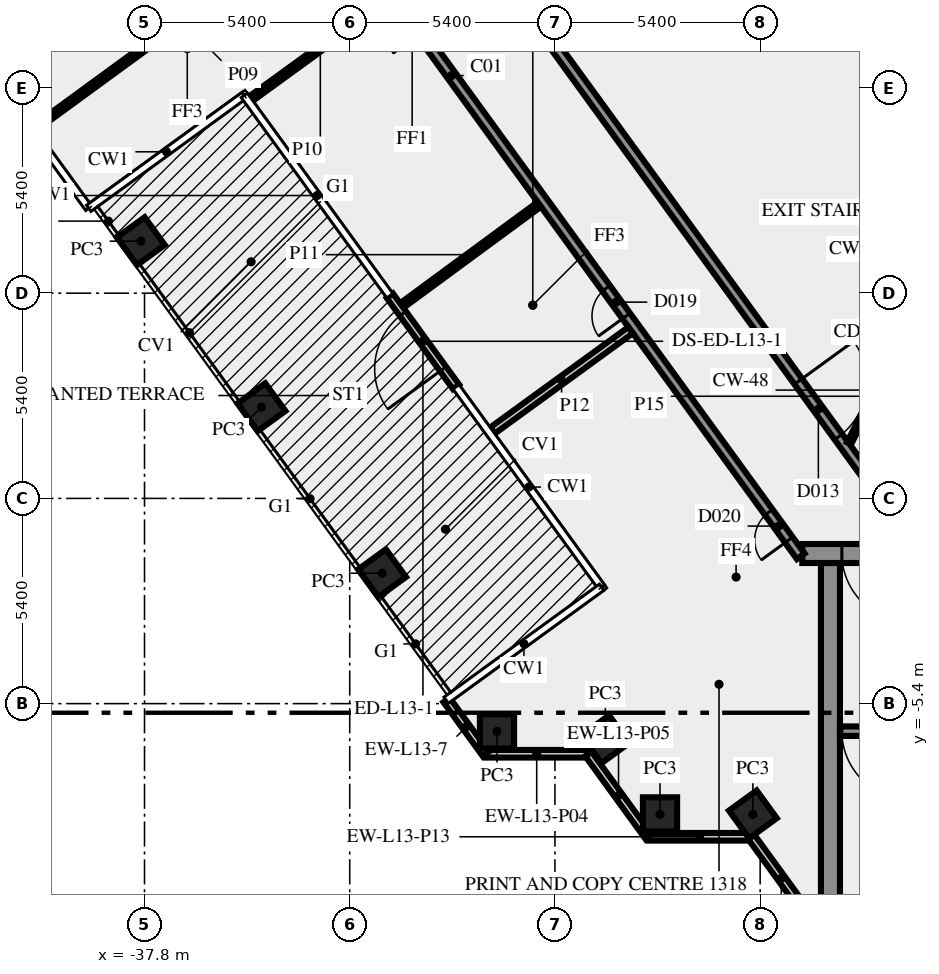
"""IFC4 building model, lengths in metres.
Left out: names, types, materials, properties, quantities, classifications, styles, units other than length and angle.
Written with IfcOpenShell. Run it as: python <this file> out.ifc"""

import sys

from ifc_helpers import new_model, si_unit, direction, frame, frame_2d, origin, origin_2d, place, context, subcontext, project, spatial, rectangle, extrude, element, fill, save


model = new_model("IFC4")
c1 = context("Model", 3, precision=1e-05, world=origin(), true_north=direction((0.0, 1.0)))
c2 = subcontext(c1, "Body", "Model", "MODEL_VIEW")
j1 = project(units=[si_unit("LENGTHUNIT", "METRE"), si_unit("PLANEANGLEUNIT", "RADIAN")], contexts=[c1])
p1 = place(None, origin())
s1 = spatial("IfcSite", under=j1, at=p1, CompositionType="ELEMENT")
p2 = place(p1, origin())
s2 = spatial("IfcBuilding", under=s1, at=p2, CompositionType="ELEMENT")
p3 = place(p2, frame((0.0, 0.0, 59.0)))
s3 = spatial("IfcBuildingStorey", under=s2, at=p3, CompositionType="ELEMENT", Elevation=59.0)
for number, where, z_axis, x_axis in (
    (1, (-37.896, 6.769, 0.0), (0.0, 0.0, 1.0), (0.588, -0.809, 0.0)),
    (2, (-34.722, 2.4, 0.0), (0.0, 0.0, 1.0), (0.588, -0.809, 0.0)),
    (3, (-31.548, -1.969, 0.0), (0.0, 0.0, 1.0), (0.588, -0.809, 0.0)),
    (4, (-28.525, -6.13, 0.0), (0.0, 0.0, 1.0), (1.0, 0.0, 0.0)),
    (5, (-25.674, -6.337, 0.0), (0.0, 0.0, 1.0), (0.588, -0.809, 0.0)),
    (6, (-24.235, -8.315, 0.0), (0.0, 0.0, 1.0), (1.0, 0.0, 0.0)),
    (7, (-21.792, -8.315, 0.0), (0.0, 0.0, 1.0), (0.588, -0.809, 0.0)),
):
    element("IfcColumn", number, at=place(p3, frame(where, z_axis=z_axis, x_axis=x_axis)), inside=s3, PredefinedType="COLUMN", context=c2, shape_type="SweptSolid", body=[
        extrude(rectangle(XDim=0.9, YDim=0.9, at=origin_2d()), origin(), (0.0, 0.0, 1.0), 3.65),
    ])
p4 = place(p3, frame((-28.83, -6.719, 0.0), z_axis=(0.0, 0.0, 1.0), x_axis=(1.0, 0.0, 0.0)))
e8 = element("IfcWall", 8, at=p4, inside=s3, PredefinedType="SOLIDWALL", context=c2, shape_type="SweptSolid", body=[
    extrude(rectangle(XDim=2.7, YDim=0.2, at=frame_2d((1.35, 0.0))), origin(), (0.0, 0.0, 1.0), 3.65),
])
p5 = place(p3, frame((-26.12, -6.724, 0.0), z_axis=(0.0, 0.0, 1.0), x_axis=(0.587720002413, -0.809064397168, 0.0)))
e9 = element("IfcWall", 9, at=p5, inside=s3, PredefinedType="SOLIDWALL", context=c2, shape_type="SweptSolid", body=[
    extrude(rectangle(XDim=2.7, YDim=0.2, at=frame_2d((1.35, 0.0))), origin(), (0.0, 0.0, 1.0), 3.65),
])
p6 = place(p3, frame((-29.602, 2.936, 0.0), z_axis=(0.0, 0.0, 1.0), x_axis=(-0.587735577821, 0.809053082661, 0.0)))
e10 = element("IfcWall", 10, at=p6, inside=s3, PredefinedType="SOLIDWALL", context=c2, shape_type="SweptSolid", body=[
    extrude(rectangle(XDim=2.963, YDim=0.2, at=frame_2d((1.481, 0.0))), origin(), (0.0, 0.0, 1.0), 3.65),
])
p7 = place(p6, frame((0.582, 0.0, 0.0)))
e11 = element("IfcOpeningElement", 11, at=p7, cuts=e10, PredefinedType="OPENING", context=c2, shape_type="SweptSolid", body=[
    extrude(rectangle(XDim=1.8, YDim=2.4, at=frame_2d((0.9, 1.2))), frame((0.0, 0.11, 0.0), z_axis=(0.0, -1.0, 0.0), x_axis=(1.0, 0.0, 0.0)), (0.0, 0.0, 1.0), 0.22),
])
p8 = place(p3, frame((-29.852, -5.304, 0.0), z_axis=(0.0, 0.0, 1.0), x_axis=(0.587783029048, -0.809018609652, 0.0)))
e12 = element("IfcWall", 12, at=p8, inside=s3, PredefinedType="SOLIDWALL", context=c2, shape_type="SweptSolid", body=[
    extrude(rectangle(XDim=1.756, YDim=0.2, at=frame_2d((0.878, 0.0))), origin(), (0.0, 0.0, 1.0), 3.65),
])
p9 = place(p3, frame((-24.543, -8.904, 0.0), z_axis=(0.0, 0.0, 1.0), x_axis=(1.0, 0.0, 0.0)))
e13 = element("IfcWall", 13, at=p9, inside=s3, PredefinedType="SOLIDWALL", context=c2, shape_type="SweptSolid", body=[
    extrude(rectangle(XDim=2.7, YDim=0.2, at=frame_2d((1.35, 0.0))), origin(), (0.0, 0.0, 1.0), 3.65),
])
p10 = place(p3, frame((-21.833, -8.909, 0.0), z_axis=(0.0, 0.0, 1.0), x_axis=(0.587766567315, -0.809030569476, 0.0)))
e14 = element("IfcWall", 14, at=p10, inside=s3, PredefinedType="SOLIDWALL", context=c2, shape_type="SweptSolid", body=[
    extrude(rectangle(XDim=2.688, YDim=0.2, at=frame_2d((1.344, 0.0))), origin(), (0.0, 0.0, 1.0), 3.65),
])
p11 = place(p3, frame((-19.75, -10.5, 0.0), z_axis=(0.0, 0.0, 1.0), x_axis=(0.0, 1.0, 0.0)))
e15 = element("IfcWall", 15, at=p11, inside=s3, PredefinedType="SHEAR", context=c2, shape_type="SweptSolid", body=[
    extrude(rectangle(XDim=8.8, YDim=0.5, at=frame_2d((4.4, 0.0))), origin(), (0.0, 0.0, 1.0), 3.65),
])
p12 = place(p3, frame((-11.45, -6.125, 0.0), z_axis=(0.0, 0.0, 1.0), x_axis=(-1.0, 0.0, 0.0)))
e16 = element("IfcWall", 16, at=p12, inside=s3, PredefinedType="SHEAR", context=c2, shape_type="SweptSolid", body=[
    extrude(rectangle(XDim=8.05, YDim=0.25, at=frame_2d((4.025, 0.0))), origin(), (0.0, 0.0, 1.0), 3.65),
])
p13 = place(p12, frame((6.2, 0.0, 0.0)))
e17 = element("IfcOpeningElement", 17, at=p13, cuts=e16, PredefinedType="OPENING", context=c2, shape_type="SweptSolid", body=[
    extrude(rectangle(XDim=1.8, YDim=2.1, at=frame_2d((0.9, 1.05))), frame((0.0, 0.135, 0.0), z_axis=(0.0, -1.0, 0.0), x_axis=(1.0, 0.0, 0.0)), (0.0, 0.0, 1.0), 0.27),
])
p14 = place(p3, frame((20.49, -1.45, 0.0), z_axis=(0.0, 0.0, 1.0), x_axis=(-1.0, 0.0, 0.0)))
e18 = element("IfcWall", 18, at=p14, inside=s3, PredefinedType="SHEAR", context=c2, shape_type="SweptSolid", body=[
    extrude(rectangle(XDim=40.98, YDim=0.5, at=frame_2d((20.49, 0.0))), origin(), (0.0, 0.0, 1.0), 3.65),
])
p15 = place(p14, frame((38.14, 0.0, 0.0)))
e19 = element("IfcOpeningElement", 19, at=p15, cuts=e18, PredefinedType="OPENING", context=c2, shape_type="SweptSolid", body=[
    extrude(rectangle(XDim=1.8, YDim=2.1, at=frame_2d((0.9, 1.05))), frame((0.0, 0.26, 0.0), z_axis=(0.0, -1.0, 0.0), x_axis=(1.0, 0.0, 0.0)), (0.0, 0.0, 1.0), 0.52),
])
p16 = place(p14, frame((35.89, 0.0, 0.0)))
e20 = element("IfcOpeningElement", 20, at=p16, cuts=e18, PredefinedType="OPENING", context=c2, shape_type="SweptSolid", body=[
    extrude(rectangle(XDim=0.9, YDim=2.1, at=frame_2d((0.45, 1.05))), frame((0.0, 0.26, 0.0), z_axis=(0.0, -1.0, 0.0), x_axis=(1.0, 0.0, 0.0)), (0.0, 0.0, 1.0), 0.52),
])
p17 = place(p14, frame((32.94, 0.0, 0.0)))
e21 = element("IfcOpeningElement", 21, at=p17, cuts=e18, PredefinedType="OPENING", context=c2, shape_type="SweptSolid", body=[
    extrude(rectangle(XDim=0.9, YDim=2.1, at=frame_2d((0.45, 1.05))), frame((0.0, 0.26, 0.0), z_axis=(0.0, -1.0, 0.0), x_axis=(1.0, 0.0, 0.0)), (0.0, 0.0, 1.0), 0.52),
])
p18 = place(p14, frame((19.59, 0.0, 0.0)))
e22 = element("IfcOpeningElement", 22, at=p18, cuts=e18, PredefinedType="OPENING", context=c2, shape_type="SweptSolid", body=[
    extrude(rectangle(XDim=2.0, YDim=2.1, at=frame_2d((1.0, 1.05))), frame((0.0, 0.26, 0.0), z_axis=(0.0, -1.0, 0.0), x_axis=(1.0, 0.0, 0.0)), (0.0, 0.0, 1.0), 0.52),
])
p19 = place(p14, frame((7.14, 0.0, 0.0)))
e23 = element("IfcOpeningElement", 23, at=p19, cuts=e18, PredefinedType="OPENING", context=c2, shape_type="SweptSolid", body=[
    extrude(rectangle(XDim=0.9, YDim=2.1, at=frame_2d((0.45, 1.05))), frame((0.0, 0.26, 0.0), z_axis=(0.0, -1.0, 0.0), x_axis=(1.0, 0.0, 0.0)), (0.0, 0.0, 1.0), 0.52),
])
p20 = place(p14, frame((5.028, 0.0, 0.0)))
e24 = element("IfcOpeningElement", 24, at=p20, cuts=e18, PredefinedType="OPENING", context=c2, shape_type="SweptSolid", body=[
    extrude(rectangle(XDim=0.8, YDim=2.1, at=frame_2d((0.4, 1.05))), frame((0.0, 0.26, 0.0), z_axis=(0.0, -1.0, 0.0), x_axis=(1.0, 0.0, 0.0)), (0.0, 0.0, 1.0), 0.52),
])
p21 = place(p14, frame((3.452, 0.0, 0.0)))
e25 = element("IfcOpeningElement", 25, at=p21, cuts=e18, PredefinedType="OPENING", context=c2, shape_type="SweptSolid", body=[
    extrude(rectangle(XDim=0.8, YDim=2.1, at=frame_2d((0.4, 1.05))), frame((0.0, 0.26, 0.0), z_axis=(0.0, -1.0, 0.0), x_axis=(1.0, 0.0, 0.0)), (0.0, 0.0, 1.0), 0.52),
])
p22 = place(p14, frame((1.04, 0.0, 0.0)))
e26 = element("IfcOpeningElement", 26, at=p22, cuts=e18, PredefinedType="OPENING", context=c2, shape_type="SweptSolid", body=[
    extrude(rectangle(XDim=1.8, YDim=2.1, at=frame_2d((0.9, 1.05))), frame((0.0, 0.26, 0.0), z_axis=(0.0, -1.0, 0.0), x_axis=(1.0, 0.0, 0.0)), (0.0, 0.0, 1.0), 0.52),
])
p23 = place(p3, frame((-20.531, -1.523, 0.0), z_axis=(0.0, 0.0, 1.0), x_axis=(-0.587784593204, 0.809017473231, 0.0)))
e27 = element("IfcWall", 27, at=p23, inside=s3, PredefinedType="SOLIDWALL", context=c2, shape_type="SweptSolid", body=[
    extrude(rectangle(XDim=44.67, YDim=0.25, at=frame_2d((22.335, 0.0))), origin(), (0.0, 0.0, 1.0), 3.65),
])
p24 = place(p23, frame((43.046, 0.0, 0.0)))
e28 = element("IfcOpeningElement", 28, at=p24, cuts=e27, PredefinedType="OPENING", context=c2, shape_type="SweptSolid", body=[
    extrude(rectangle(XDim=1.2, YDim=2.1, at=frame_2d((0.6, 1.05))), frame((0.0, 0.135, 0.0), z_axis=(0.0, -1.0, 0.0), x_axis=(1.0, 0.0, 0.0)), (0.0, 0.0, 1.0), 0.27),
])
p25 = place(p23, frame((21.266, 0.0, 0.0)))
e29 = element("IfcOpeningElement", 29, at=p25, cuts=e27, PredefinedType="OPENING", context=c2, shape_type="SweptSolid", body=[
    extrude(rectangle(XDim=1.2, YDim=2.1, at=frame_2d((0.6, 1.05))), frame((0.0, 0.135, 0.0), z_axis=(0.0, -1.0, 0.0), x_axis=(1.0, 0.0, 0.0)), (0.0, 0.0, 1.0), 0.27),
])
p26 = place(p23, frame((17.015, 0.0, 0.0)))
e30 = element("IfcOpeningElement", 30, at=p26, cuts=e27, PredefinedType="OPENING", context=c2, shape_type="SweptSolid", body=[
    extrude(rectangle(XDim=0.9, YDim=2.1, at=frame_2d((0.45, 1.05))), frame((0.0, 0.135, 0.0), z_axis=(0.0, -1.0, 0.0), x_axis=(1.0, 0.0, 0.0)), (0.0, 0.0, 1.0), 0.27),
])
p27 = place(p23, frame((0.533, 0.0, 0.0)))
e31 = element("IfcOpeningElement", 31, at=p27, cuts=e27, PredefinedType="OPENING", context=c2, shape_type="SweptSolid", body=[
    extrude(rectangle(XDim=0.9, YDim=2.1, at=frame_2d((0.45, 1.05))), frame((0.0, 0.135, 0.0), z_axis=(0.0, -1.0, 0.0), x_axis=(1.0, 0.0, 0.0)), (0.0, 0.0, 1.0), 0.27),
])
p28 = place(p23, frame((18.616, 0.0, 0.0)))
e32 = element("IfcOpeningElement", 32, at=p28, cuts=e27, PredefinedType="OPENING", context=c2, shape_type="SweptSolid", body=[
    extrude(rectangle(XDim=0.9, YDim=2.1, at=frame_2d((0.45, 1.05))), frame((0.0, 0.135, 0.0), z_axis=(0.0, -1.0, 0.0), x_axis=(1.0, 0.0, 0.0)), (0.0, 0.0, 1.0), 0.27),
])
p29 = place(p23, frame((7.816, 0.0, 0.0)))
e33 = element("IfcOpeningElement", 33, at=p29, cuts=e27, PredefinedType="OPENING", context=c2, shape_type="SweptSolid", body=[
    extrude(rectangle(XDim=0.9, YDim=2.1, at=frame_2d((0.45, 1.05))), frame((0.0, 0.135, 0.0), z_axis=(0.0, -1.0, 0.0), x_axis=(1.0, 0.0, 0.0)), (0.0, 0.0, 1.0), 0.27),
])
p30 = place(p3, frame((-37.232, 25.972, 0.0), z_axis=(0.0, 0.0, 1.0), x_axis=(0.587786323093, -0.809016216391, 0.0)))
e34 = element("IfcWall", 34, at=p30, inside=s3, PredefinedType="SOLIDWALL", context=c2, shape_type="SweptSolid", body=[
    extrude(rectangle(XDim=33.493, YDim=0.25, at=frame_2d((16.747, 0.0))), origin(), (0.0, 0.0, 1.0), 3.65),
])
p31 = place(p30, frame((28.301, 0.0, 0.0)))
e35 = element("IfcOpeningElement", 35, at=p31, cuts=e34, PredefinedType="OPENING", context=c2, shape_type="SweptSolid", body=[
    extrude(rectangle(XDim=1.8, YDim=2.1, at=frame_2d((0.9, 1.05))), frame((0.0, 0.135, 0.0), z_axis=(0.0, -1.0, 0.0), x_axis=(1.0, 0.0, 0.0)), (0.0, 0.0, 1.0), 0.27),
])
p32 = place(p30, frame((4.235, 0.0, 0.0)))
e36 = element("IfcOpeningElement", 36, at=p32, cuts=e34, PredefinedType="OPENING", context=c2, shape_type="SweptSolid", body=[
    extrude(rectangle(XDim=1.8, YDim=2.1, at=frame_2d((0.9, 1.05))), frame((0.0, 0.135, 0.0), z_axis=(0.0, -1.0, 0.0), x_axis=(1.0, 0.0, 0.0)), (0.0, 0.0, 1.0), 0.27),
])
p33 = place(p30, frame((2.685, 0.0, 0.0)))
e37 = element("IfcOpeningElement", 37, at=p33, cuts=e34, PredefinedType="OPENING", context=c2, shape_type="SweptSolid", body=[
    extrude(rectangle(XDim=0.9, YDim=2.1, at=frame_2d((0.45, 1.05))), frame((0.0, 0.135, 0.0), z_axis=(0.0, -1.0, 0.0), x_axis=(1.0, 0.0, 0.0)), (0.0, 0.0, 1.0), 0.27),
])
p34 = place(p3, frame((-40.68, 9.75, 0.0), z_axis=(0.0, 0.0, 1.0), x_axis=(0.807645841498, 0.589667868135, 0.0)))
e38 = element("IfcWall", 38, at=p34, inside=s3, PredefinedType="PARTITIONING", context=c2, shape_type="SweptSolid", body=[
    extrude(rectangle(XDim=9.551, YDim=0.15, at=frame_2d((4.775, 0.0))), origin(), (0.0, 0.0, 1.0), 2.75),
])
p35 = place(p3, frame((-31.356, 13.164, 0.0), z_axis=(0.0, 0.0, 1.0), x_axis=(-0.80905553785, -0.587732198092, 0.0)))
e39 = element("IfcWall", 39, at=p35, inside=s3, PredefinedType="PARTITIONING", context=c2, shape_type="SweptSolid", body=[
    extrude(rectangle(XDim=4.493, YDim=0.15, at=frame_2d((2.247, 0.0))), origin(), (0.0, 0.0, 1.0), 3.65),
])
p36 = place(p3, frame((-31.008, 5.091, 0.0), z_axis=(0.0, 0.0, 1.0), x_axis=(0.805604164151, 0.592454159157, 0.0)))
e40 = element("IfcWall", 40, at=p36, inside=s3, PredefinedType="PARTITIONING", context=c2, shape_type="SweptSolid", body=[
    extrude(rectangle(XDim=4.462, YDim=0.15, at=frame_2d((2.231, 0.0))), origin(), (0.0, 0.0, 1.0), 3.65),
])
p37 = place(p3, frame((-25.008, 4.427, 0.0), z_axis=(0.0, 0.0, 1.0), x_axis=(-0.809074306937, -0.58770636023, 0.0)))
e41 = element("IfcWall", 41, at=p37, inside=s3, PredefinedType="SOLIDWALL", context=c2, shape_type="SweptSolid", body=[
    extrude(rectangle(XDim=4.493, YDim=0.2, at=frame_2d((2.247, 0.0))), origin(), (0.0, 0.0, 1.0), 3.65),
])
p38 = place(p3, frame((-19.261, 1.45, 0.0), z_axis=(0.0, 0.0, 1.0), x_axis=(0.453950796792, 0.891026752736, 0.0)))
e42 = element("IfcWall", 42, at=p38, inside=s3, PredefinedType="PARTITIONING", context=c2, shape_type="SweptSolid", body=[
    extrude(rectangle(XDim=2.778, YDim=0.12, at=frame_2d((1.389, 0.0))), origin(), (0.0, 0.0, 1.0), 3.65),
])
p39 = place(p7, origin())
e43 = element("IfcDoor", 43, at=p39, inside=s3, OperationType="DOUBLE_DOOR_SINGLE_SWING", PredefinedType="DOOR", context=c2, shape_type="SweptSolid", body=[
    extrude(rectangle(XDim=1.8, YDim=2.4, at=frame_2d((0.9, 1.2))), frame((0.0, 0.025, 0.0), z_axis=(0.0, -1.0, 0.0), x_axis=(1.0, 0.0, 0.0)), (0.0, 0.0, 1.0), 0.05),
])
fill(e11, e43)
p40 = place(p13, origin())
e44 = element("IfcDoor", 44, at=p40, inside=s3, OperationType="DOUBLE_DOOR_SINGLE_SWING", PredefinedType="DOOR", context=c2, shape_type="SweptSolid", body=[
    extrude(rectangle(XDim=1.8, YDim=2.1, at=frame_2d((0.9, 1.05))), frame((0.0, 0.025, 0.0), z_axis=(0.0, -1.0, 0.0), x_axis=(1.0, 0.0, 0.0)), (0.0, 0.0, 1.0), 0.05),
])
fill(e17, e44)
p41 = place(p15, origin())
e45 = element("IfcDoor", 45, at=p41, inside=s3, OperationType="DOUBLE_DOOR_SINGLE_SWING", PredefinedType="DOOR", context=c2, shape_type="SweptSolid", body=[
    extrude(rectangle(XDim=1.8, YDim=2.1, at=frame_2d((0.9, 1.05))), frame((0.0, 0.025, 0.0), z_axis=(0.0, -1.0, 0.0), x_axis=(1.0, 0.0, 0.0)), (0.0, 0.0, 1.0), 0.05),
])
fill(e19, e45)
p42 = place(p31, origin())
e46 = element("IfcDoor", 46, at=p42, inside=s3, OperationType="DOUBLE_DOOR_SINGLE_SWING", PredefinedType="DOOR", context=c2, shape_type="SweptSolid", body=[
    extrude(rectangle(XDim=1.8, YDim=2.1, at=frame_2d((0.9, 1.05))), frame((0.0, 0.025, 0.0), z_axis=(0.0, -1.0, 0.0), x_axis=(1.0, 0.0, 0.0)), (0.0, 0.0, 1.0), 0.05),
])
fill(e35, e46)
p43 = place(p27, origin())
e47 = element("IfcDoor", 47, at=p43, inside=s3, OperationType="SINGLE_SWING_LEFT", PredefinedType="DOOR", context=c2, shape_type="SweptSolid", body=[
    extrude(rectangle(XDim=0.9, YDim=2.1, at=frame_2d((0.45, 1.05))), frame((0.0, 0.025, 0.0), z_axis=(0.0, -1.0, 0.0), x_axis=(1.0, 0.0, 0.0)), (0.0, 0.0, 1.0), 0.05),
])
fill(e31, e47)
p44 = place(p29, origin())
e48 = element("IfcDoor", 48, at=p44, inside=s3, OperationType="SINGLE_SWING_LEFT", PredefinedType="DOOR", context=c2, shape_type="SweptSolid", body=[
    extrude(rectangle(XDim=0.9, YDim=2.1, at=frame_2d((0.45, 1.05))), frame((0.0, 0.025, 0.0), z_axis=(0.0, -1.0, 0.0), x_axis=(1.0, 0.0, 0.0)), (0.0, 0.0, 1.0), 0.05),
])
fill(e33, e48)
save(model, sys.argv[1])
